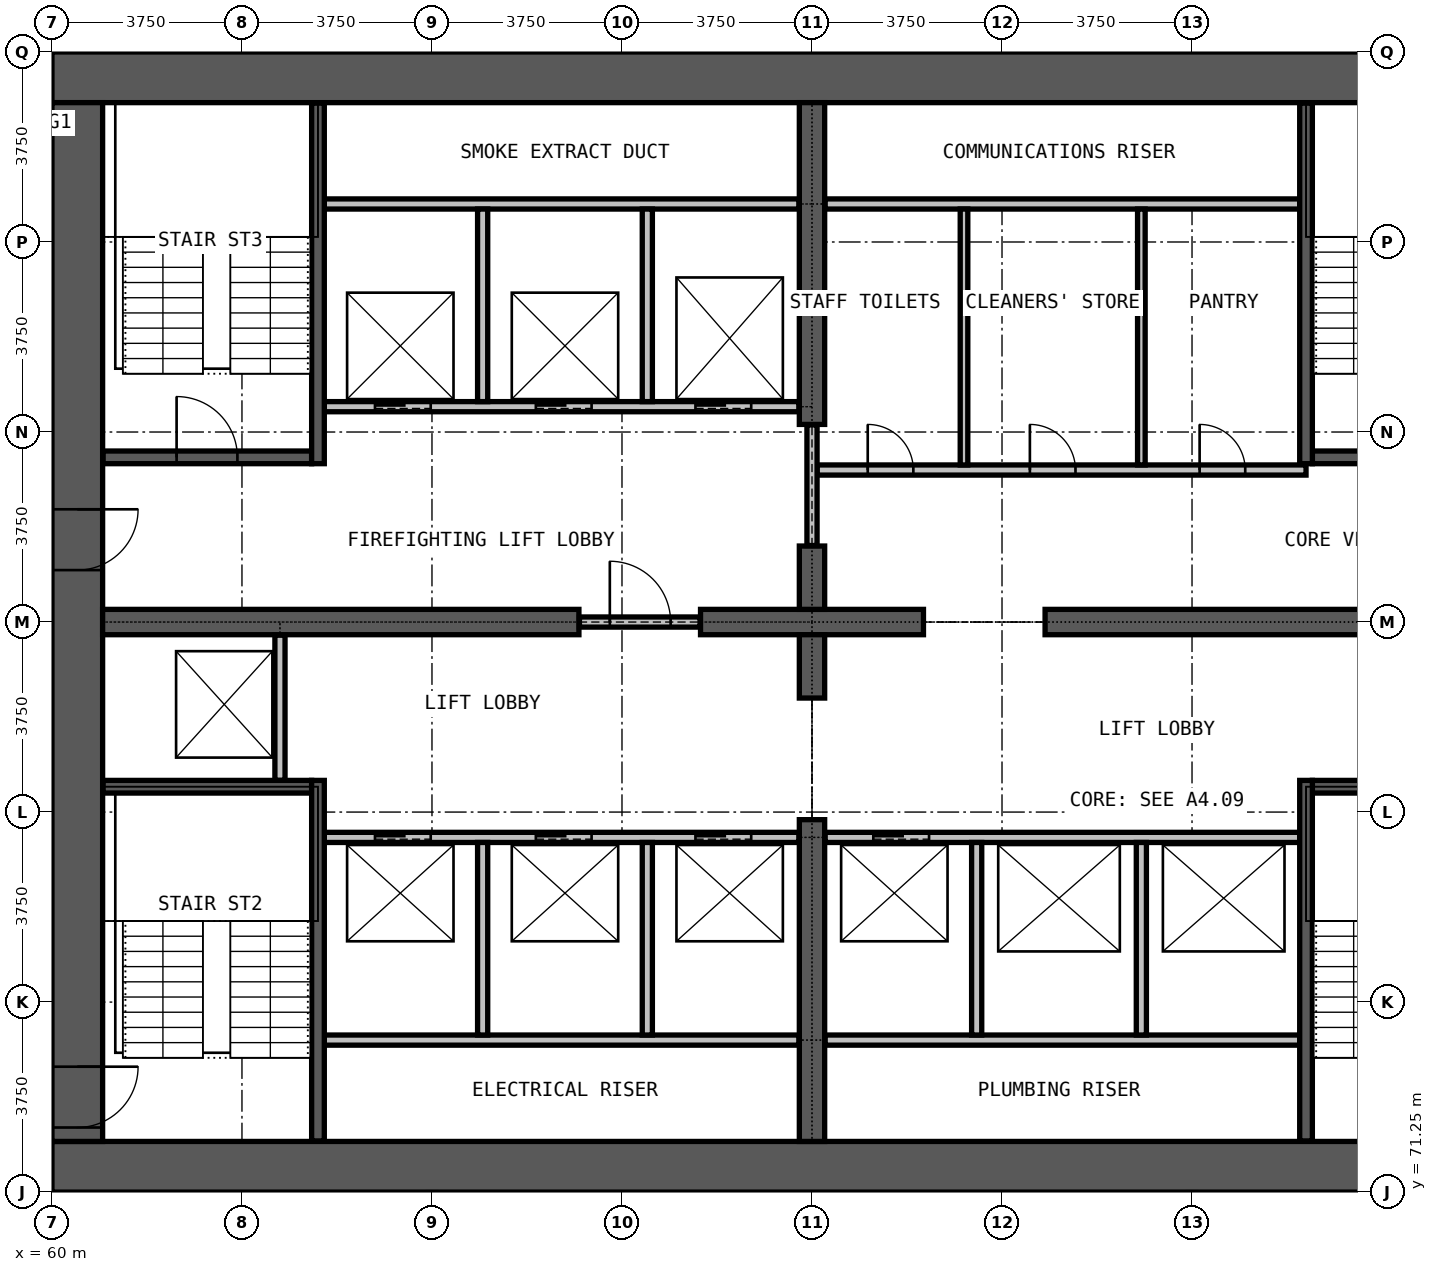
"""IFC4 building model, lengths in metres.
Left out: names, types, materials, properties, quantities, classifications, styles, units other than length and angle.
Written with IfcOpenShell. Run it as: python <this file> out.ifc"""

import sys

from ifc_helpers import new_model, si_unit, direction, frame, frame_2d, origin, place, context, subcontext, project, spatial, rectangle, extrude, element, fill, save


model = new_model("IFC4")
c1 = context("Model", 3, precision=1e-05, world=origin(), true_north=direction((0.0, 1.0)))
c2 = subcontext(c1, "Body", "Model", "MODEL_VIEW")
j1 = project(units=[si_unit("LENGTHUNIT", "METRE"), si_unit("PLANEANGLEUNIT", "RADIAN")], contexts=[c1])
p1 = place(None, origin())
s1 = spatial("IfcSite", under=j1, at=p1, CompositionType="ELEMENT")
p2 = place(p1, origin())
s2 = spatial("IfcBuilding", under=s1, at=p2, CompositionType="ELEMENT")
p3 = place(p2, frame((0.0, 0.0, 95.6)))
s3 = spatial("IfcBuildingStorey", under=s2, at=p3, CompositionType="ELEMENT", Elevation=95.6)
for number, where, z_axis, x_axis in (
    (1, (60.0, 71.75, 0.0), (0.0, 0.0, 1.0), (1.0, 0.0, 0.0)),
    (2, (90.0, 93.25, 0.0), (0.0, 0.0, 1.0), (-1.0, 0.0, 0.0)),
):
    element("IfcWall", number, at=place(p3, frame(where, z_axis=z_axis, x_axis=x_axis)), inside=s3, PredefinedType="SHEAR", context=c2, shape_type="SweptSolid", body=[
        extrude(rectangle(XDim=30.0, YDim=1.0, at=frame_2d((15.0, 0.0))), origin(), (0.0, 0.0, 1.0), 3.3),
    ])
p4 = place(p3, frame((60.5, 92.75, 0.0), z_axis=(0.0, 0.0, 1.0), x_axis=(0.0, -1.0, 0.0)))
e3 = element("IfcWall", 3, at=p4, inside=s3, PredefinedType="SHEAR", context=c2, shape_type="SweptSolid", body=[
    extrude(rectangle(XDim=20.5, YDim=1.0, at=frame_2d((10.25, 0.0))), origin(), (0.0, 0.0, 1.0), 3.3),
])
p5 = place(p4, frame((19.025, 0.0, 0.0)))
e4 = element("IfcOpeningElement", 4, at=p5, cuts=e3, PredefinedType="OPENING", context=c2, shape_type="SweptSolid", body=[
    extrude(rectangle(XDim=1.2, YDim=2.2, at=frame_2d((0.6, 1.1))), frame((0.0, 0.51, 0.0), z_axis=(0.0, -1.0, 0.0), x_axis=(1.0, 0.0, 0.0)), (0.0, 0.0, 1.0), 1.02),
])
p6 = place(p4, frame((8.025, 0.0, 0.0)))
e5 = element("IfcOpeningElement", 5, at=p6, cuts=e3, PredefinedType="OPENING", context=c2, shape_type="SweptSolid", body=[
    extrude(rectangle(XDim=1.2, YDim=2.2, at=frame_2d((0.6, 1.1))), frame((0.0, 0.51, 0.0), z_axis=(0.0, -1.0, 0.0), x_axis=(1.0, 0.0, 0.0)), (0.0, 0.0, 1.0), 1.02),
])
p7 = place(p3, frame((61.0, 82.5, 0.0), z_axis=(0.0, 0.0, 1.0), x_axis=(1.0, 0.0, 0.0)))
e6 = element("IfcWall", 6, at=p7, inside=s3, PredefinedType="SHEAR", context=c2, shape_type="SweptSolid", body=[
    extrude(rectangle(XDim=9.4, YDim=0.5, at=frame_2d((4.7, 0.0))), origin(), (0.0, 0.0, 1.0), 3.3),
])
p8 = place(p3, frame((72.8, 82.5, 0.0), z_axis=(0.0, 0.0, 1.0), x_axis=(1.0, 0.0, 0.0)))
e7 = element("IfcWall", 7, at=p8, inside=s3, PredefinedType="SHEAR", context=c2, shape_type="SweptSolid", body=[
    extrude(rectangle(XDim=4.4, YDim=0.5, at=frame_2d((2.2, 0.0))), origin(), (0.0, 0.0, 1.0), 3.3),
])
p9 = place(p3, frame((79.6, 82.5, 0.0), z_axis=(0.0, 0.0, 1.0), x_axis=(1.0, 0.0, 0.0)))
e8 = element("IfcWall", 8, at=p9, inside=s3, PredefinedType="SHEAR", context=c2, shape_type="SweptSolid", body=[
    extrude(rectangle(XDim=9.4, YDim=0.5, at=frame_2d((4.7, 0.0))), origin(), (0.0, 0.0, 1.0), 3.3),
])
p10 = place(p3, frame((75.0, 72.25, 0.0), z_axis=(0.0, 0.0, 1.0), x_axis=(0.0, 1.0, 0.0)))
e9 = element("IfcWall", 9, at=p10, inside=s3, PredefinedType="SHEAR", context=c2, shape_type="SweptSolid", body=[
    extrude(rectangle(XDim=6.35, YDim=0.5, at=frame_2d((3.175, 0.0))), origin(), (0.0, 0.0, 1.0), 3.3),
])
for number, where, z_axis, x_axis in (
    (10, (75.0, 81.0, 0.0), (0.0, 0.0, 1.0), (0.0, 1.0, 0.0)),
    (11, (75.0, 82.75, 0.0), (0.0, 0.0, 1.0), (0.0, 1.0, 0.0)),
):
    element("IfcWall", number, at=place(p3, frame(where, z_axis=z_axis, x_axis=x_axis)), inside=s3, PredefinedType="SHEAR", context=c2, shape_type="SweptSolid", body=[
        extrude(rectangle(XDim=1.25, YDim=0.5, at=frame_2d((0.625, 0.0))), origin(), (0.0, 0.0, 1.0), 3.3),
    ])
p11 = place(p3, frame((75.0, 86.4, 0.0), z_axis=(0.0, 0.0, 1.0), x_axis=(0.0, 1.0, 0.0)))
e12 = element("IfcWall", 12, at=p11, inside=s3, PredefinedType="SHEAR", context=c2, shape_type="SweptSolid", body=[
    extrude(rectangle(XDim=6.35, YDim=0.5, at=frame_2d((3.175, 0.0))), origin(), (0.0, 0.0, 1.0), 3.3),
])
p12 = place(p3, frame((70.41, 82.5, 0.0), z_axis=(0.0, 0.0, 1.0), x_axis=(1.0, 0.0, 0.0)))
e13 = element("IfcWall", 13, at=p12, inside=s3, PredefinedType="PARTITIONING", context=c2, shape_type="SweptSolid", body=[
    extrude(rectangle(XDim=2.38, YDim=0.2, at=frame_2d((1.19, 0.0))), origin(), (0.0, 0.0, 1.0), 2.4),
])
p13 = place(p12, frame((0.6, 0.0, 0.0)))
e14 = element("IfcOpeningElement", 14, at=p13, cuts=e13, PredefinedType="OPENING", context=c2, shape_type="SweptSolid", body=[
    extrude(rectangle(XDim=1.2, YDim=2.2, at=frame_2d((0.6, 1.1))), frame((0.0, 0.11, 0.0), z_axis=(0.0, -1.0, 0.0), x_axis=(1.0, 0.0, 0.0)), (0.0, 0.0, 1.0), 0.22),
])
p14 = place(p3, frame((75.1, 85.5, 0.0), z_axis=(0.0, 0.0, 1.0), x_axis=(1.0, 0.0, 0.0)))
e15 = element("IfcWall", 15, at=p14, inside=s3, PredefinedType="PARTITIONING", context=c2, shape_type="SweptSolid", body=[
    extrude(rectangle(XDim=9.65, YDim=0.2, at=frame_2d((4.825, 0.0))), origin(), (0.0, 0.0, 1.0), 3.0),
])
p15 = place(p14, frame((1.0, 0.0, 0.0)))
e16 = element("IfcOpeningElement", 16, at=p15, cuts=e15, PredefinedType="OPENING", context=c2, shape_type="SweptSolid", body=[
    extrude(rectangle(XDim=0.9, YDim=2.2, at=frame_2d((0.45, 1.1))), frame((0.0, 0.11, 0.0), z_axis=(0.0, -1.0, 0.0), x_axis=(1.0, 0.0, 0.0)), (0.0, 0.0, 1.0), 0.22),
])
p16 = place(p14, frame((4.2, 0.0, 0.0)))
e17 = element("IfcOpeningElement", 17, at=p16, cuts=e15, PredefinedType="OPENING", context=c2, shape_type="SweptSolid", body=[
    extrude(rectangle(XDim=0.9, YDim=2.2, at=frame_2d((0.45, 1.1))), frame((0.0, 0.11, 0.0), z_axis=(0.0, -1.0, 0.0), x_axis=(1.0, 0.0, 0.0)), (0.0, 0.0, 1.0), 0.22),
])
p17 = place(p14, frame((7.55, 0.0, 0.0)))
e18 = element("IfcOpeningElement", 18, at=p17, cuts=e15, PredefinedType="OPENING", context=c2, shape_type="SweptSolid", body=[
    extrude(rectangle(XDim=0.9, YDim=2.2, at=frame_2d((0.45, 1.1))), frame((0.0, 0.11, 0.0), z_axis=(0.0, -1.0, 0.0), x_axis=(1.0, 0.0, 0.0)), (0.0, 0.0, 1.0), 0.22),
])
p18 = place(p3, frame((75.26, 90.75, 0.0), z_axis=(0.0, 0.0, 1.0), x_axis=(1.0, 0.0, 0.0)))
e19 = element("IfcWall", 19, at=p18, inside=s3, PredefinedType="PARTITIONING", context=c2, shape_type="SweptSolid", body=[
    extrude(rectangle(XDim=9.365, YDim=0.2, at=frame_2d((4.683, 0.0))), origin(), (0.0, 0.0, 1.0), 3.0),
])
p19 = place(p3, frame((75.0, 84.01, 0.0), z_axis=(0.0, 0.0, 1.0), x_axis=(0.0, 1.0, 0.0)))
e20 = element("IfcWall", 20, at=p19, inside=s3, PredefinedType="PARTITIONING", context=c2, shape_type="SweptSolid", body=[
    extrude(rectangle(XDim=2.38, YDim=0.2, at=frame_2d((1.19, 0.0))), origin(), (0.0, 0.0, 1.0), 2.4),
])
for number, where, z_axis, x_axis in (
    (21, (78.0, 85.6, 0.0), (0.0, 0.0, 1.0), (0.0, 1.0, 0.0)),
    (22, (81.5, 85.6, 0.0), (0.0, 0.0, 1.0), (0.0, 1.0, 0.0)),
):
    element("IfcWall", number, at=place(p3, frame(where, z_axis=z_axis, x_axis=x_axis)), inside=s3, PredefinedType="PARTITIONING", context=c2, shape_type="SweptSolid", body=[
        extrude(rectangle(XDim=5.05, YDim=0.15, at=frame_2d((2.525, 0.0))), origin(), (0.0, 0.0, 1.0), 3.0),
    ])
for number, where, z_axis, x_axis in (
    (23, (65.375, 74.25, 0.0), (0.0, 0.0, 1.0), (1.0, 0.0, 0.0)),
    (24, (75.26, 74.25, 0.0), (0.0, 0.0, 1.0), (1.0, 0.0, 0.0)),
):
    element("IfcWall", number, at=place(p3, frame(where, z_axis=z_axis, x_axis=x_axis)), inside=s3, PredefinedType="PARTITIONING", context=c2, shape_type="SweptSolid", body=[
        extrude(rectangle(XDim=9.365, YDim=0.2, at=frame_2d((4.683, 0.0))), origin(), (0.0, 0.0, 1.0), 3.0),
    ])
p20 = place(p3, frame((65.375, 78.25, 0.0), z_axis=(0.0, 0.0, 1.0), x_axis=(1.0, 0.0, 0.0)))
e25 = element("IfcWall", 25, at=p20, inside=s3, PredefinedType="PARTITIONING", context=c2, shape_type="SweptSolid", body=[
    extrude(rectangle(XDim=9.365, YDim=0.2, at=frame_2d((4.683, 0.0))), origin(), (0.0, 0.0, 1.0), 3.0),
])
p21 = place(p20, frame((1.0, 0.0, 0.0)))
e26 = element("IfcOpeningElement", 26, at=p21, cuts=e25, PredefinedType="OPENING", context=c2, shape_type="SweptSolid", body=[
    extrude(rectangle(XDim=1.1, YDim=2.2, at=frame_2d((0.55, 1.1))), frame((0.0, 0.11, 0.0), z_axis=(0.0, -1.0, 0.0), x_axis=(1.0, 0.0, 0.0)), (0.0, 0.0, 1.0), 0.22),
])
p22 = place(p20, frame((4.175, 0.0, 0.0)))
e27 = element("IfcOpeningElement", 27, at=p22, cuts=e25, PredefinedType="OPENING", context=c2, shape_type="SweptSolid", body=[
    extrude(rectangle(XDim=1.1, YDim=2.2, at=frame_2d((0.55, 1.1))), frame((0.0, 0.11, 0.0), z_axis=(0.0, -1.0, 0.0), x_axis=(1.0, 0.0, 0.0)), (0.0, 0.0, 1.0), 0.22),
])
p23 = place(p20, frame((7.325, 0.0, 0.0)))
e28 = element("IfcOpeningElement", 28, at=p23, cuts=e25, PredefinedType="OPENING", context=c2, shape_type="SweptSolid", body=[
    extrude(rectangle(XDim=1.1, YDim=2.2, at=frame_2d((0.55, 1.1))), frame((0.0, 0.11, 0.0), z_axis=(0.0, -1.0, 0.0), x_axis=(1.0, 0.0, 0.0)), (0.0, 0.0, 1.0), 0.22),
])
p24 = place(p3, frame((75.26, 78.25, 0.0), z_axis=(0.0, 0.0, 1.0), x_axis=(1.0, 0.0, 0.0)))
e29 = element("IfcWall", 29, at=p24, inside=s3, PredefinedType="PARTITIONING", context=c2, shape_type="SweptSolid", body=[
    extrude(rectangle(XDim=9.365, YDim=0.2, at=frame_2d((4.683, 0.0))), origin(), (0.0, 0.0, 1.0), 3.0),
])
p25 = place(p24, frame((0.95, 0.0, 0.0)))
e30 = element("IfcOpeningElement", 30, at=p25, cuts=e29, PredefinedType="OPENING", context=c2, shape_type="SweptSolid", body=[
    extrude(rectangle(XDim=1.1, YDim=2.2, at=frame_2d((0.55, 1.1))), frame((0.0, 0.11, 0.0), z_axis=(0.0, -1.0, 0.0), x_axis=(1.0, 0.0, 0.0)), (0.0, 0.0, 1.0), 0.22),
])
p26 = place(p3, frame((65.375, 86.75, 0.0), z_axis=(0.0, 0.0, 1.0), x_axis=(1.0, 0.0, 0.0)))
e31 = element("IfcWall", 31, at=p26, inside=s3, PredefinedType="PARTITIONING", context=c2, shape_type="SweptSolid", body=[
    extrude(rectangle(XDim=9.365, YDim=0.2, at=frame_2d((4.683, 0.0))), origin(), (0.0, 0.0, 1.0), 3.0),
])
p27 = place(p26, frame((1.0, 0.0, 0.0)))
e32 = element("IfcOpeningElement", 32, at=p27, cuts=e31, PredefinedType="OPENING", context=c2, shape_type="SweptSolid", body=[
    extrude(rectangle(XDim=1.1, YDim=2.2, at=frame_2d((0.55, 1.1))), frame((0.0, 0.11, 0.0), z_axis=(0.0, -1.0, 0.0), x_axis=(1.0, 0.0, 0.0)), (0.0, 0.0, 1.0), 0.22),
])
p28 = place(p26, frame((4.175, 0.0, 0.0)))
e33 = element("IfcOpeningElement", 33, at=p28, cuts=e31, PredefinedType="OPENING", context=c2, shape_type="SweptSolid", body=[
    extrude(rectangle(XDim=1.1, YDim=2.2, at=frame_2d((0.55, 1.1))), frame((0.0, 0.11, 0.0), z_axis=(0.0, -1.0, 0.0), x_axis=(1.0, 0.0, 0.0)), (0.0, 0.0, 1.0), 0.22),
])
p29 = place(p26, frame((7.325, 0.0, 0.0)))
e34 = element("IfcOpeningElement", 34, at=p29, cuts=e31, PredefinedType="OPENING", context=c2, shape_type="SweptSolid", body=[
    extrude(rectangle(XDim=1.1, YDim=2.2, at=frame_2d((0.55, 1.1))), frame((0.0, 0.11, 0.0), z_axis=(0.0, -1.0, 0.0), x_axis=(1.0, 0.0, 0.0)), (0.0, 0.0, 1.0), 0.22),
])
p30 = place(p3, frame((65.375, 90.75, 0.0), z_axis=(0.0, 0.0, 1.0), x_axis=(1.0, 0.0, 0.0)))
e35 = element("IfcWall", 35, at=p30, inside=s3, PredefinedType="PARTITIONING", context=c2, shape_type="SweptSolid", body=[
    extrude(rectangle(XDim=9.365, YDim=0.2, at=frame_2d((4.683, 0.0))), origin(), (0.0, 0.0, 1.0), 3.0),
])
p31 = place(p3, frame((64.5, 79.375, 0.0), z_axis=(0.0, 0.0, 1.0), x_axis=(0.0, 1.0, 0.0)))
e36 = element("IfcWall", 36, at=p31, inside=s3, PredefinedType="PARTITIONING", context=c2, shape_type="SweptSolid", body=[
    extrude(rectangle(XDim=2.865, YDim=0.2, at=frame_2d((1.433, 0.0))), origin(), (0.0, 0.0, 1.0), 3.0),
])
for number, where, z_axis, x_axis in (
    (37, (68.5, 74.35, 0.0), (0.0, 0.0, 1.0), (0.0, 1.0, 0.0)),
    (38, (68.5, 86.85, 0.0), (0.0, 0.0, 1.0), (0.0, 1.0, 0.0)),
    (39, (71.75, 74.35, 0.0), (0.0, 0.0, 1.0), (0.0, 1.0, 0.0)),
    (40, (71.75, 86.85, 0.0), (0.0, 0.0, 1.0), (0.0, 1.0, 0.0)),
    (41, (78.25, 74.35, 0.0), (0.0, 0.0, 1.0), (0.0, 1.0, 0.0)),
    (42, (81.5, 74.35, 0.0), (0.0, 0.0, 1.0), (0.0, 1.0, 0.0)),
):
    element("IfcWall", number, at=place(p3, frame(where, z_axis=z_axis, x_axis=x_axis)), inside=s3, PredefinedType="PARTITIONING", context=c2, shape_type="SweptSolid", body=[
        extrude(rectangle(XDim=3.8, YDim=0.2, at=frame_2d((1.9, 0.0))), origin(), (0.0, 0.0, 1.0), 3.0),
    ])
for number, where, z_axis, x_axis in (
    (43, (61.01, 79.25, 0.0), (0.0, 0.0, 1.0), (1.0, 0.0, 0.0)),
    (44, (84.875, 79.25, 0.0), (0.0, 0.0, 1.0), (1.0, 0.0, 0.0)),
):
    element("IfcWall", number, at=place(p3, frame(where, z_axis=z_axis, x_axis=x_axis)), inside=s3, PredefinedType="PARTITIONING", context=c2, shape_type="SweptSolid", body=[
        extrude(rectangle(XDim=4.115, YDim=0.25, at=frame_2d((2.058, 0.0))), origin(), (0.0, 0.0, 1.0), 3.0),
    ])
p32 = place(p3, frame((61.01, 85.75, 0.0), z_axis=(0.0, 0.0, 1.0), x_axis=(1.0, 0.0, 0.0)))
e45 = element("IfcWall", 45, at=p32, inside=s3, PredefinedType="PARTITIONING", context=c2, shape_type="SweptSolid", body=[
    extrude(rectangle(XDim=4.115, YDim=0.25, at=frame_2d((2.058, 0.0))), origin(), (0.0, 0.0, 1.0), 3.0),
])
p33 = place(p32, frame((1.45, 0.0, 0.0)))
e46 = element("IfcOpeningElement", 46, at=p33, cuts=e45, PredefinedType="OPENING", context=c2, shape_type="SweptSolid", body=[
    extrude(rectangle(XDim=1.2, YDim=2.2, at=frame_2d((0.6, 1.1))), frame((0.0, 0.135, 0.0), z_axis=(0.0, -1.0, 0.0), x_axis=(1.0, 0.0, 0.0)), (0.0, 0.0, 1.0), 0.27),
])
p34 = place(p3, frame((84.875, 85.75, 0.0), z_axis=(0.0, 0.0, 1.0), x_axis=(1.0, 0.0, 0.0)))
e47 = element("IfcWall", 47, at=p34, inside=s3, PredefinedType="PARTITIONING", context=c2, shape_type="SweptSolid", body=[
    extrude(rectangle(XDim=4.115, YDim=0.25, at=frame_2d((2.058, 0.0))), origin(), (0.0, 0.0, 1.0), 3.0),
])
for number, where, z_axis, x_axis in (
    (48, (65.25, 72.26, 0.0), (0.0, 0.0, 1.0), (0.0, 1.0, 0.0)),
    (49, (65.25, 85.625, 0.0), (0.0, 0.0, 1.0), (0.0, 1.0, 0.0)),
    (50, (84.75, 72.26, 0.0), (0.0, 0.0, 1.0), (0.0, 1.0, 0.0)),
    (51, (84.75, 85.625, 0.0), (0.0, 0.0, 1.0), (0.0, 1.0, 0.0)),
):
    element("IfcWall", number, at=place(p3, frame(where, z_axis=z_axis, x_axis=x_axis)), inside=s3, PredefinedType="PARTITIONING", context=c2, shape_type="SweptSolid", body=[
        extrude(rectangle(XDim=7.115, YDim=0.25, at=frame_2d((3.558, 0.0))), origin(), (0.0, 0.0, 1.0), 3.0),
    ])
p35 = place(p21, origin())
e52 = element("IfcDoor", 52, at=p35, inside=s3, OperationType="DOUBLE_DOOR_SLIDING", PredefinedType="DOOR", context=c2, shape_type="SweptSolid", body=[
    extrude(rectangle(XDim=1.1, YDim=2.2, at=frame_2d((0.55, 1.1))), frame((0.0, 0.025, 0.0), z_axis=(0.0, -1.0, 0.0), x_axis=(1.0, 0.0, 0.0)), (0.0, 0.0, 1.0), 0.05),
])
fill(e26, e52)
p36 = place(p22, origin())
e53 = element("IfcDoor", 53, at=p36, inside=s3, OperationType="DOUBLE_DOOR_SLIDING", PredefinedType="DOOR", context=c2, shape_type="SweptSolid", body=[
    extrude(rectangle(XDim=1.1, YDim=2.2, at=frame_2d((0.55, 1.1))), frame((0.0, 0.025, 0.0), z_axis=(0.0, -1.0, 0.0), x_axis=(1.0, 0.0, 0.0)), (0.0, 0.0, 1.0), 0.05),
])
fill(e27, e53)
p37 = place(p23, origin())
e54 = element("IfcDoor", 54, at=p37, inside=s3, OperationType="DOUBLE_DOOR_SLIDING", PredefinedType="DOOR", context=c2, shape_type="SweptSolid", body=[
    extrude(rectangle(XDim=1.1, YDim=2.2, at=frame_2d((0.55, 1.1))), frame((0.0, 0.025, 0.0), z_axis=(0.0, -1.0, 0.0), x_axis=(1.0, 0.0, 0.0)), (0.0, 0.0, 1.0), 0.05),
])
fill(e28, e54)
p38 = place(p25, origin())
e55 = element("IfcDoor", 55, at=p38, inside=s3, OperationType="DOUBLE_DOOR_SLIDING", PredefinedType="DOOR", context=c2, shape_type="SweptSolid", body=[
    extrude(rectangle(XDim=1.1, YDim=2.2, at=frame_2d((0.55, 1.1))), frame((0.0, 0.025, 0.0), z_axis=(0.0, -1.0, 0.0), x_axis=(1.0, 0.0, 0.0)), (0.0, 0.0, 1.0), 0.05),
])
fill(e30, e55)
p39 = place(p27, origin())
e56 = element("IfcDoor", 56, at=p39, inside=s3, OperationType="DOUBLE_DOOR_SLIDING", PredefinedType="DOOR", context=c2, shape_type="SweptSolid", body=[
    extrude(rectangle(XDim=1.1, YDim=2.2, at=frame_2d((0.55, 1.1))), frame((0.0, 0.025, 0.0), z_axis=(0.0, -1.0, 0.0), x_axis=(1.0, 0.0, 0.0)), (0.0, 0.0, 1.0), 0.05),
])
fill(e32, e56)
p40 = place(p28, origin())
e57 = element("IfcDoor", 57, at=p40, inside=s3, OperationType="DOUBLE_DOOR_SLIDING", PredefinedType="DOOR", context=c2, shape_type="SweptSolid", body=[
    extrude(rectangle(XDim=1.1, YDim=2.2, at=frame_2d((0.55, 1.1))), frame((0.0, 0.025, 0.0), z_axis=(0.0, -1.0, 0.0), x_axis=(1.0, 0.0, 0.0)), (0.0, 0.0, 1.0), 0.05),
])
fill(e33, e57)
p41 = place(p29, origin())
e58 = element("IfcDoor", 58, at=p41, inside=s3, OperationType="DOUBLE_DOOR_SLIDING", PredefinedType="DOOR", context=c2, shape_type="SweptSolid", body=[
    extrude(rectangle(XDim=1.1, YDim=2.2, at=frame_2d((0.55, 1.1))), frame((0.0, 0.025, 0.0), z_axis=(0.0, -1.0, 0.0), x_axis=(1.0, 0.0, 0.0)), (0.0, 0.0, 1.0), 0.05),
])
fill(e34, e58)
p42 = place(p13, origin())
e59 = element("IfcDoor", 59, at=p42, inside=s3, OperationType="SINGLE_SWING_LEFT", PredefinedType="DOOR", context=c2, shape_type="SweptSolid", body=[
    extrude(rectangle(XDim=1.2, YDim=2.2, at=frame_2d((0.6, 1.1))), frame((0.0, 0.025, 0.0), z_axis=(0.0, -1.0, 0.0), x_axis=(1.0, 0.0, 0.0)), (0.0, 0.0, 1.0), 0.05),
])
fill(e14, e59)
p43 = place(p33, origin())
e60 = element("IfcDoor", 60, at=p43, inside=s3, OperationType="SINGLE_SWING_LEFT", PredefinedType="DOOR", context=c2, shape_type="SweptSolid", body=[
    extrude(rectangle(XDim=1.2, YDim=2.2, at=frame_2d((0.6, 1.1))), frame((0.0, 0.025, 0.0), z_axis=(0.0, -1.0, 0.0), x_axis=(1.0, 0.0, 0.0)), (0.0, 0.0, 1.0), 0.05),
])
fill(e46, e60)
p44 = place(p5, origin())
e61 = element("IfcDoor", 61, at=p44, inside=s3, OperationType="SINGLE_SWING_RIGHT", PredefinedType="DOOR", context=c2, shape_type="SweptSolid", body=[
    extrude(rectangle(XDim=1.2, YDim=2.2, at=frame_2d((0.6, 1.1))), frame((0.0, 0.025, 0.0), z_axis=(0.0, -1.0, 0.0), x_axis=(1.0, 0.0, 0.0)), (0.0, 0.0, 1.0), 0.05),
])
fill(e4, e61)
p45 = place(p6, origin())
e62 = element("IfcDoor", 62, at=p45, inside=s3, OperationType="SINGLE_SWING_LEFT", PredefinedType="DOOR", context=c2, shape_type="SweptSolid", body=[
    extrude(rectangle(XDim=1.2, YDim=2.2, at=frame_2d((0.6, 1.1))), frame((0.0, 0.025, 0.0), z_axis=(0.0, -1.0, 0.0), x_axis=(1.0, 0.0, 0.0)), (0.0, 0.0, 1.0), 0.05),
])
fill(e5, e62)
p46 = place(p15, origin())
e63 = element("IfcDoor", 63, at=p46, inside=s3, OperationType="SINGLE_SWING_LEFT", PredefinedType="DOOR", context=c2, shape_type="SweptSolid", body=[
    extrude(rectangle(XDim=0.9, YDim=2.2, at=frame_2d((0.45, 1.1))), frame((0.0, 0.025, 0.0), z_axis=(0.0, -1.0, 0.0), x_axis=(1.0, 0.0, 0.0)), (0.0, 0.0, 1.0), 0.05),
])
fill(e16, e63)
p47 = place(p16, origin())
e64 = element("IfcDoor", 64, at=p47, inside=s3, OperationType="SINGLE_SWING_RIGHT", PredefinedType="DOOR", context=c2, shape_type="SweptSolid", body=[
    extrude(rectangle(XDim=0.9, YDim=2.2, at=frame_2d((0.45, 1.1))), frame((0.0, 0.025, 0.0), z_axis=(0.0, -1.0, 0.0), x_axis=(1.0, 0.0, 0.0)), (0.0, 0.0, 1.0), 0.05),
])
fill(e17, e64)
p48 = place(p17, origin())
e65 = element("IfcDoor", 65, at=p48, inside=s3, OperationType="SINGLE_SWING_LEFT", PredefinedType="DOOR", context=c2, shape_type="SweptSolid", body=[
    extrude(rectangle(XDim=0.9, YDim=2.2, at=frame_2d((0.45, 1.1))), frame((0.0, 0.025, 0.0), z_axis=(0.0, -1.0, 0.0), x_axis=(1.0, 0.0, 0.0)), (0.0, 0.0, 1.0), 0.05),
])
fill(e18, e65)
save(model, sys.argv[1])
